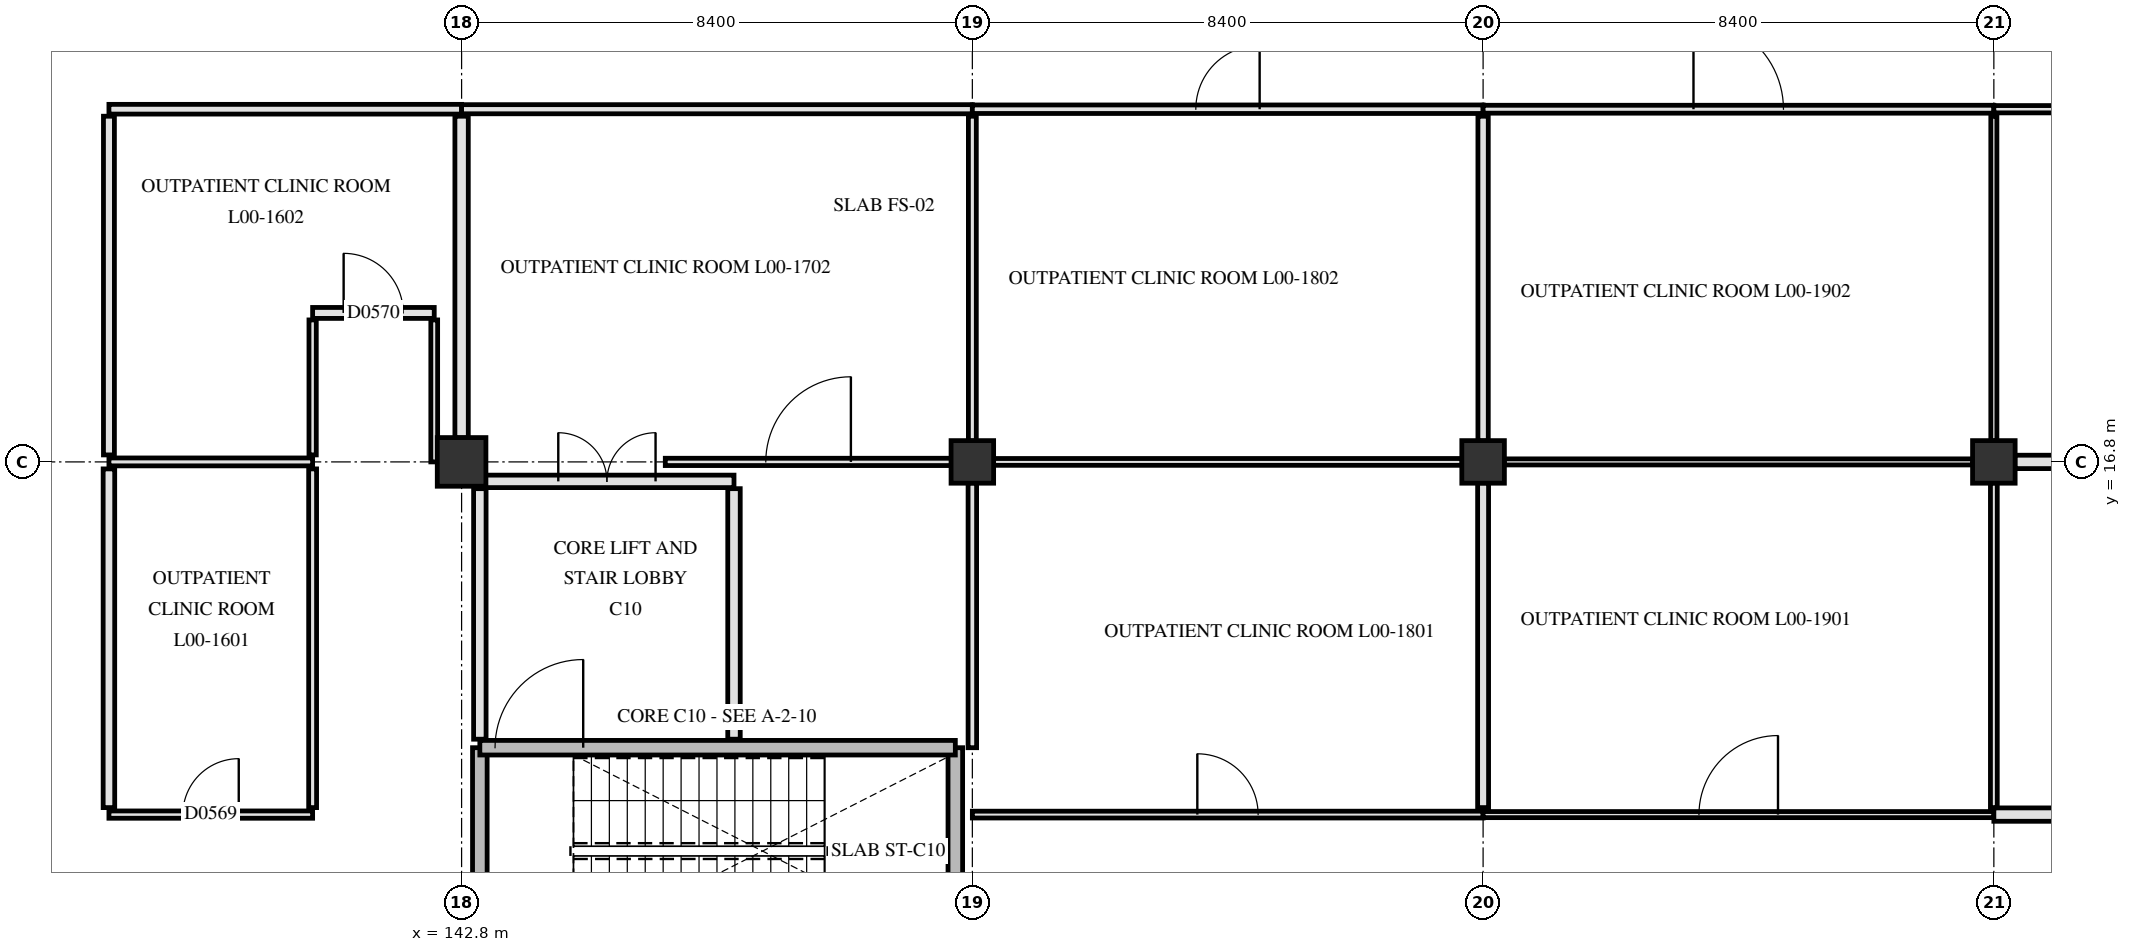
"""IFC4 building model, lengths in metres.
Left out: names, types, materials, properties, quantities, classifications, styles, units other than length and angle.
Written with IfcOpenShell. Run it as: python <this file> out.ifc"""

import sys

from ifc_helpers import new_model, si_unit, direction, frame, frame_2d, origin, origin_2d, place, context, subcontext, project, spatial, rectangle, extrude, element, fill, save


model = new_model("IFC4")
c1 = context("Model", 3, precision=1e-05, world=origin(), true_north=direction((0.0, 1.0)))
c2 = subcontext(c1, "Body", "Model", "MODEL_VIEW")
j1 = project(units=[si_unit("LENGTHUNIT", "METRE"), si_unit("PLANEANGLEUNIT", "RADIAN")], contexts=[c1])
p1 = place(None, origin())
s1 = spatial("IfcSite", under=j1, at=p1, CompositionType="ELEMENT")
p2 = place(p1, origin())
s2 = spatial("IfcBuilding", under=s1, at=p2, CompositionType="ELEMENT")
p3 = place(p2, origin())
s3 = spatial("IfcBuildingStorey", under=s2, at=p3, CompositionType="ELEMENT", Elevation=0.0)
p4 = place(p3, frame((142.8, 16.8, 0.0), z_axis=(0.0, 0.0, 1.0), x_axis=(1.0, 0.0, 0.0)))
e1 = element("IfcColumn", 1, at=p4, inside=s3, PredefinedType="COLUMN", context=c2, shape_type="SweptSolid", body=[
    extrude(rectangle(XDim=0.8, YDim=0.8, at=origin_2d()), origin(), (0.0, 0.0, 1.0), 4.8),
])
for number, where, z_axis, x_axis in (
    (2, (151.2, 16.8, 0.0), (0.0, 0.0, 1.0), (1.0, 0.0, 0.0)),
    (3, (159.6, 16.8, 0.0), (0.0, 0.0, 1.0), (1.0, 0.0, 0.0)),
    (4, (168.0, 16.8, 0.0), (0.0, 0.0, 1.0), (1.0, 0.0, 0.0)),
):
    element("IfcColumn", number, at=place(p3, frame(where, z_axis=z_axis, x_axis=x_axis)), inside=s3, PredefinedType="COLUMN", context=c2, shape_type="SweptSolid", body=[
        extrude(rectangle(XDim=0.7, YDim=0.7, at=origin_2d()), origin(), (0.0, 0.0, 1.0), 4.8),
    ])
for number, where, z_axis, x_axis in (
    (5, (143.1, 8.78, 0.0), (0.0, 0.0, 1.0), (0.0, 1.0, 0.0)),
    (6, (150.92, 8.78, 0.0), (0.0, 0.0, 1.0), (0.0, 1.0, 0.0)),
):
    element("IfcWall", number, at=place(p3, frame(where, z_axis=z_axis, x_axis=x_axis)), inside=s3, PredefinedType="SHEAR", context=c2, shape_type="SweptSolid", body=[
        extrude(rectangle(XDim=3.32, YDim=0.24, at=frame_2d((1.66, 0.0))), origin(), (0.0, 0.0, 1.0), 4.5),
    ])
p5 = place(p3, frame((143.1, 12.1, 0.0), z_axis=(0.0, 0.0, 1.0), x_axis=(1.0, 0.0, 0.0)))
e7 = element("IfcWall", 7, at=p5, inside=s3, PredefinedType="SHEAR", context=c2, shape_type="SweptSolid", body=[
    extrude(rectangle(XDim=7.82, YDim=0.24, at=frame_2d((3.91, 0.0))), origin(), (0.0, 0.0, 1.0), 4.5),
])
p6 = place(p5, frame((0.25, 0.0, 0.0)))
e8 = element("IfcOpeningElement", 8, at=p6, cuts=e7, PredefinedType="OPENING", context=c2, shape_type="SweptSolid", body=[
    extrude(rectangle(XDim=1.45, YDim=2.2, at=frame_2d((0.725, 1.1))), frame((0.0, 0.13, 0.0), z_axis=(0.0, -1.0, 0.0), x_axis=(1.0, 0.0, 0.0)), (0.0, 0.0, 1.0), 0.26),
])
p7 = place(p3, frame((147.28, 12.24, 0.0), z_axis=(0.0, 0.0, 1.0), x_axis=(0.0, 1.0, 0.0)))
e9 = element("IfcWall", 9, at=p7, inside=s3, PredefinedType="PARTITIONING", context=c2, shape_type="SweptSolid", body=[
    extrude(rectangle(XDim=4.12, YDim=0.205, at=frame_2d((2.06, 0.0))), origin(), (0.0, 0.0, 1.0), 4.49),
])
p8 = place(p3, frame((143.1, 12.24, 0.0), z_axis=(0.0, 0.0, 1.0), x_axis=(0.0, 1.0, 0.0)))
e10 = element("IfcWall", 10, at=p8, inside=s3, PredefinedType="PARTITIONING", context=c2, shape_type="SweptSolid", body=[
    extrude(rectangle(XDim=4.12, YDim=0.205, at=frame_2d((2.06, 0.0))), origin(), (0.0, 0.0, 1.0), 3.89),
])
p9 = place(p3, frame((143.1, 16.48, 0.0), z_axis=(0.0, 0.0, 1.0), x_axis=(1.0, 0.0, 0.0)))
e11 = element("IfcWall", 11, at=p9, inside=s3, PredefinedType="PARTITIONING", context=c2, shape_type="SweptSolid", body=[
    extrude(rectangle(XDim=4.18, YDim=0.205, at=frame_2d((2.09, 0.0))), origin(), (0.0, 0.0, 1.0), 3.84),
])
p10 = place(p9, frame((1.29, 0.0, 0.0)))
e12 = element("IfcOpeningElement", 12, at=p10, cuts=e11, PredefinedType="OPENING", context=c2, shape_type="SweptSolid", body=[
    extrude(rectangle(XDim=1.6, YDim=2.25, at=frame_2d((0.8, 1.125))), frame((0.0, 0.113, 0.0), z_axis=(0.0, -1.0, 0.0), x_axis=(1.0, 0.0, 0.0)), (0.0, 0.0, 1.0), 0.225),
])
p11 = place(p3, frame((137.0, 11.0, 0.0), z_axis=(0.0, 0.0, 1.0), x_axis=(1.0, 0.0, 0.0)))
e13 = element("IfcWall", 13, at=p11, inside=s3, PredefinedType="PARTITIONING", context=c2, shape_type="SweptSolid", body=[
    extrude(rectangle(XDim=3.35, YDim=0.12, at=frame_2d((1.675, 0.0))), origin(), (0.0, 0.0, 1.0), 4.49),
])
p12 = place(p11, frame((1.215, 0.0, 0.0)))
e14 = element("IfcOpeningElement", 14, at=p12, cuts=e13, PredefinedType="OPENING", context=c2, shape_type="SweptSolid", body=[
    extrude(rectangle(XDim=0.92, YDim=2.08, at=frame_2d((0.46, 1.04))), frame((0.0, 0.07, 0.0), z_axis=(0.0, -1.0, 0.0), x_axis=(1.0, 0.0, 0.0)), (0.0, 0.0, 1.0), 0.14),
])
p13 = place(p3, frame((151.2, 11.0, 0.0), z_axis=(0.0, 0.0, 1.0), x_axis=(1.0, 0.0, 0.0)))
e15 = element("IfcWall", 15, at=p13, inside=s3, PredefinedType="PARTITIONING", context=c2, shape_type="SweptSolid", body=[
    extrude(rectangle(XDim=8.4, YDim=0.112, at=frame_2d((4.2, 0.0))), origin(), (0.0, 0.0, 1.0), 3.89),
])
p14 = place(p13, frame((3.7, 0.0, 0.0)))
e16 = element("IfcOpeningElement", 16, at=p14, cuts=e15, PredefinedType="OPENING", context=c2, shape_type="SweptSolid", body=[
    extrude(rectangle(XDim=1.0, YDim=2.15, at=frame_2d((0.5, 1.075))), frame((0.0, 0.066, 0.0), z_axis=(0.0, -1.0, 0.0), x_axis=(1.0, 0.0, 0.0)), (0.0, 0.0, 1.0), 0.132),
])
p15 = place(p3, frame((159.6, 11.0, 0.0), z_axis=(0.0, 0.0, 1.0), x_axis=(1.0, 0.0, 0.0)))
e17 = element("IfcWall", 17, at=p15, inside=s3, PredefinedType="PARTITIONING", context=c2, shape_type="SweptSolid", body=[
    extrude(rectangle(XDim=8.4, YDim=0.1, at=frame_2d((4.2, 0.0))), origin(), (0.0, 0.0, 1.0), 3.89),
])
p16 = place(p15, frame((3.55, 0.0, 0.0)))
e18 = element("IfcOpeningElement", 18, at=p16, cuts=e17, PredefinedType="OPENING", context=c2, shape_type="SweptSolid", body=[
    extrude(rectangle(XDim=1.3, YDim=2.2, at=frame_2d((0.65, 1.1))), frame((0.0, 0.06, 0.0), z_axis=(0.0, -1.0, 0.0), x_axis=(1.0, 0.0, 0.0)), (0.0, 0.0, 1.0), 0.12),
])
p17 = place(p3, frame((168.0, 11.0, 0.0), z_axis=(0.0, 0.0, 1.0), x_axis=(1.0, 0.0, 0.0)))
e19 = element("IfcWall", 19, at=p17, inside=s3, PredefinedType="PARTITIONING", context=c2, shape_type="SweptSolid", body=[
    extrude(rectangle(XDim=8.018, YDim=0.22, at=frame_2d((4.009, 0.0))), origin(), (0.0, 0.0, 1.0), 3.89),
])
p18 = place(p17, frame((3.469, 0.0, 0.0)))
e20 = element("IfcOpeningElement", 20, at=p18, cuts=e19, PredefinedType="OPENING", context=c2, shape_type="SweptSolid", body=[
    extrude(rectangle(XDim=1.08, YDim=2.12, at=frame_2d((0.54, 1.06))), frame((0.0, 0.12, 0.0), z_axis=(0.0, -1.0, 0.0), x_axis=(1.0, 0.0, 0.0)), (0.0, 0.0, 1.0), 0.24),
])
p19 = place(p3, frame((137.0, 16.8, 0.0), z_axis=(0.0, 0.0, 1.0), x_axis=(1.0, 0.0, 0.0)))
e21 = element("IfcWall", 21, at=p19, inside=s3, PredefinedType="PARTITIONING", context=c2, shape_type="SweptSolid", body=[
    extrude(rectangle(XDim=3.35, YDim=0.13, at=frame_2d((1.675, 0.0))), origin(), (0.0, 0.0, 1.0), 3.84),
])
p20 = place(p3, frame((146.15, 16.8, 0.0), z_axis=(0.0, 0.0, 1.0), x_axis=(1.0, 0.0, 0.0)))
e22 = element("IfcWall", 22, at=p20, inside=s3, PredefinedType="PARTITIONING", context=c2, shape_type="SweptSolid", body=[
    extrude(rectangle(XDim=4.705, YDim=0.12, at=frame_2d((2.353, 0.0))), origin(), (0.0, 0.0, 1.0), 3.84),
])
p21 = place(p20, frame((1.653, 0.0, 0.0)))
e23 = element("IfcOpeningElement", 23, at=p21, cuts=e22, PredefinedType="OPENING", context=c2, shape_type="SweptSolid", body=[
    extrude(rectangle(XDim=1.4, YDim=2.2, at=frame_2d((0.7, 1.1))), frame((0.0, 0.07, 0.0), z_axis=(0.0, -1.0, 0.0), x_axis=(1.0, 0.0, 0.0)), (0.0, 0.0, 1.0), 0.14),
])
p22 = place(p3, frame((151.545, 16.8, 0.0), z_axis=(0.0, 0.0, 1.0), x_axis=(1.0, 0.0, 0.0)))
e24 = element("IfcWall", 24, at=p22, inside=s3, PredefinedType="PARTITIONING", context=c2, shape_type="SweptSolid", body=[
    extrude(rectangle(XDim=7.71, YDim=0.112, at=frame_2d((3.855, 0.0))), origin(), (0.0, 0.0, 1.0), 3.84),
])
p23 = place(p3, frame((159.945, 16.8, 0.0), z_axis=(0.0, 0.0, 1.0), x_axis=(1.0, 0.0, 0.0)))
e25 = element("IfcWall", 25, at=p23, inside=s3, PredefinedType="PARTITIONING", context=c2, shape_type="SweptSolid", body=[
    extrude(rectangle(XDim=7.71, YDim=0.1, at=frame_2d((3.855, 0.0))), origin(), (0.0, 0.0, 1.0), 3.84),
])
p24 = place(p3, frame((168.345, 16.8, 0.0), z_axis=(0.0, 0.0, 1.0), x_axis=(1.0, 0.0, 0.0)))
e26 = element("IfcWall", 26, at=p24, inside=s3, PredefinedType="PARTITIONING", context=c2, shape_type="SweptSolid", body=[
    extrude(rectangle(XDim=7.665, YDim=0.22, at=frame_2d((3.833, 0.0))), origin(), (0.0, 0.0, 1.0), 3.84),
])
p25 = place(p3, frame((140.35, 19.25, 0.0), z_axis=(0.0, 0.0, 1.0), x_axis=(1.0, 0.0, 0.0)))
e27 = element("IfcWall", 27, at=p25, inside=s3, PredefinedType="PARTITIONING", context=c2, shape_type="SweptSolid", body=[
    extrude(rectangle(XDim=2.0, YDim=0.18, at=frame_2d((1.0, 0.0))), origin(), (0.0, 0.0, 1.0), 4.49),
])
p26 = place(p25, frame((0.51, 0.0, 0.0)))
e28 = element("IfcOpeningElement", 28, at=p26, cuts=e27, PredefinedType="OPENING", context=c2, shape_type="SweptSolid", body=[
    extrude(rectangle(XDim=0.98, YDim=2.12, at=frame_2d((0.49, 1.06))), frame((0.0, 0.1, 0.0), z_axis=(0.0, -1.0, 0.0), x_axis=(1.0, 0.0, 0.0)), (0.0, 0.0, 1.0), 0.2),
])
p27 = place(p3, frame((137.0, 22.6, 0.0), z_axis=(0.0, 0.0, 1.0), x_axis=(1.0, 0.0, 0.0)))
e29 = element("IfcWall", 29, at=p27, inside=s3, PredefinedType="PARTITIONING", context=c2, shape_type="SweptSolid", body=[
    extrude(rectangle(XDim=5.8, YDim=0.16, at=frame_2d((2.9, 0.0))), origin(), (0.0, 0.0, 1.0), 3.89),
])
p28 = place(p3, frame((142.8, 22.6, 0.0), z_axis=(0.0, 0.0, 1.0), x_axis=(1.0, 0.0, 0.0)))
e30 = element("IfcWall", 30, at=p28, inside=s3, PredefinedType="PARTITIONING", context=c2, shape_type="SweptSolid", body=[
    extrude(rectangle(XDim=8.4, YDim=0.15, at=frame_2d((4.2, 0.0))), origin(), (0.0, 0.0, 1.0), 3.89),
])
p29 = place(p3, frame((151.2, 22.6, 0.0), z_axis=(0.0, 0.0, 1.0), x_axis=(1.0, 0.0, 0.0)))
e31 = element("IfcWall", 31, at=p29, inside=s3, PredefinedType="PARTITIONING", context=c2, shape_type="SweptSolid", body=[
    extrude(rectangle(XDim=8.4, YDim=0.14, at=frame_2d((4.2, 0.0))), origin(), (0.0, 0.0, 1.0), 3.89),
])
p30 = place(p29, frame((3.675, 0.0, 0.0)))
e32 = element("IfcOpeningElement", 32, at=p30, cuts=e31, PredefinedType="OPENING", context=c2, shape_type="SweptSolid", body=[
    extrude(rectangle(XDim=1.05, YDim=2.15, at=frame_2d((0.525, 1.075))), frame((0.0, 0.08, 0.0), z_axis=(0.0, -1.0, 0.0), x_axis=(1.0, 0.0, 0.0)), (0.0, 0.0, 1.0), 0.16),
])
p31 = place(p3, frame((159.6, 22.6, 0.0), z_axis=(0.0, 0.0, 1.0), x_axis=(1.0, 0.0, 0.0)))
e33 = element("IfcWall", 33, at=p31, inside=s3, PredefinedType="PARTITIONING", context=c2, shape_type="SweptSolid", body=[
    extrude(rectangle(XDim=8.4, YDim=0.13, at=frame_2d((4.2, 0.0))), origin(), (0.0, 0.0, 1.0), 3.89),
])
p32 = place(p31, frame((3.46, 0.0, 0.0)))
e34 = element("IfcOpeningElement", 34, at=p32, cuts=e33, PredefinedType="OPENING", context=c2, shape_type="SweptSolid", body=[
    extrude(rectangle(XDim=1.48, YDim=2.22, at=frame_2d((0.74, 1.11))), frame((0.0, 0.075, 0.0), z_axis=(0.0, -1.0, 0.0), x_axis=(1.0, 0.0, 0.0)), (0.0, 0.0, 1.0), 0.15),
])
p33 = place(p3, frame((168.0, 22.6, 0.0), z_axis=(0.0, 0.0, 1.0), x_axis=(1.0, 0.0, 0.0)))
e35 = element("IfcWall", 35, at=p33, inside=s3, PredefinedType="PARTITIONING", context=c2, shape_type="SweptSolid", body=[
    extrude(rectangle(XDim=8.01, YDim=0.12, at=frame_2d((4.005, 0.0))), origin(), (0.0, 0.0, 1.0), 3.89),
])
p34 = place(p33, frame((3.395, 0.0, 0.0)))
e36 = element("IfcOpeningElement", 36, at=p34, cuts=e35, PredefinedType="OPENING", context=c2, shape_type="SweptSolid", body=[
    extrude(rectangle(XDim=1.22, YDim=2.18, at=frame_2d((0.61, 1.09))), frame((0.0, 0.07, 0.0), z_axis=(0.0, -1.0, 0.0), x_axis=(1.0, 0.0, 0.0)), (0.0, 0.0, 1.0), 0.14),
])
p35 = place(p3, frame((137.0, 11.115, 0.0), z_axis=(0.0, 0.0, 1.0), x_axis=(0.0, 1.0, 0.0)))
e37 = element("IfcWall", 37, at=p35, inside=s3, PredefinedType="PARTITIONING", context=c2, shape_type="SweptSolid", body=[
    extrude(rectangle(XDim=5.57, YDim=0.19, at=frame_2d((2.785, 0.0))), origin(), (0.0, 0.0, 1.0), 3.84),
])
p36 = place(p3, frame((137.0, 16.915, 0.0), z_axis=(0.0, 0.0, 1.0), x_axis=(0.0, 1.0, 0.0)))
e38 = element("IfcWall", 38, at=p36, inside=s3, PredefinedType="PARTITIONING", context=c2, shape_type="SweptSolid", body=[
    extrude(rectangle(XDim=5.57, YDim=0.18, at=frame_2d((2.785, 0.0))), origin(), (0.0, 0.0, 1.0), 3.84),
])
p37 = place(p3, frame((140.35, 11.115, 0.0), z_axis=(0.0, 0.0, 1.0), x_axis=(0.0, 1.0, 0.0)))
e39 = element("IfcWall", 39, at=p37, inside=s3, PredefinedType="PARTITIONING", context=c2, shape_type="SweptSolid", body=[
    extrude(rectangle(XDim=5.57, YDim=0.13, at=frame_2d((2.785, 0.0))), origin(), (0.0, 0.0, 1.0), 3.84),
])
p38 = place(p3, frame((140.35, 16.915, 0.0), z_axis=(0.0, 0.0, 1.0), x_axis=(0.0, 1.0, 0.0)))
e40 = element("IfcWall", 40, at=p38, inside=s3, PredefinedType="PARTITIONING", context=c2, shape_type="SweptSolid", body=[
    extrude(rectangle(XDim=2.22, YDim=0.12, at=frame_2d((1.11, 0.0))), origin(), (0.0, 0.0, 1.0), 3.84),
])
p39 = place(p3, frame((142.35, 16.8, 0.0), z_axis=(0.0, 0.0, 1.0), x_axis=(0.0, 1.0, 0.0)))
e41 = element("IfcWall", 41, at=p39, inside=s3, PredefinedType="PARTITIONING", context=c2, shape_type="SweptSolid", body=[
    extrude(rectangle(XDim=2.335, YDim=0.112, at=frame_2d((1.167, 0.0))), origin(), (0.0, 0.0, 1.0), 3.84),
])
p40 = place(p3, frame((142.8, 17.195, 0.0), z_axis=(0.0, 0.0, 1.0), x_axis=(0.0, 1.0, 0.0)))
e42 = element("IfcWall", 42, at=p40, inside=s3, PredefinedType="PARTITIONING", context=c2, shape_type="SweptSolid", body=[
    extrude(rectangle(XDim=5.29, YDim=0.22, at=frame_2d((2.645, 0.0))), origin(), (0.0, 0.0, 1.0), 3.89),
])
p41 = place(p3, frame((151.2, 12.1, 0.0), z_axis=(0.0, 0.0, 1.0), x_axis=(0.0, 1.0, 0.0)))
e43 = element("IfcWall", 43, at=p41, inside=s3, PredefinedType="PARTITIONING", context=c2, shape_type="SweptSolid", body=[
    extrude(rectangle(XDim=4.355, YDim=0.14, at=frame_2d((2.177, 0.0))), origin(), (0.0, 0.0, 1.0), 3.89),
])
p42 = place(p3, frame((151.2, 17.145, 0.0), z_axis=(0.0, 0.0, 1.0), x_axis=(0.0, 1.0, 0.0)))
e44 = element("IfcWall", 44, at=p42, inside=s3, PredefinedType="PARTITIONING", context=c2, shape_type="SweptSolid", body=[
    extrude(rectangle(XDim=5.34, YDim=0.13, at=frame_2d((2.67, 0.0))), origin(), (0.0, 0.0, 1.0), 3.89),
])
p43 = place(p3, frame((159.6, 11.115, 0.0), z_axis=(0.0, 0.0, 1.0), x_axis=(0.0, 1.0, 0.0)))
e45 = element("IfcWall", 45, at=p43, inside=s3, PredefinedType="PARTITIONING", context=c2, shape_type="SweptSolid", body=[
    extrude(rectangle(XDim=5.34, YDim=0.18, at=frame_2d((2.67, 0.0))), origin(), (0.0, 0.0, 1.0), 3.89),
])
p44 = place(p3, frame((159.6, 17.145, 0.0), z_axis=(0.0, 0.0, 1.0), x_axis=(0.0, 1.0, 0.0)))
e46 = element("IfcWall", 46, at=p44, inside=s3, PredefinedType="PARTITIONING", context=c2, shape_type="SweptSolid", body=[
    extrude(rectangle(XDim=5.34, YDim=0.17, at=frame_2d((2.67, 0.0))), origin(), (0.0, 0.0, 1.0), 3.89),
])
p45 = place(p3, frame((168.0, 11.115, 0.0), z_axis=(0.0, 0.0, 1.0), x_axis=(0.0, 1.0, 0.0)))
e47 = element("IfcWall", 47, at=p45, inside=s3, PredefinedType="PARTITIONING", context=c2, shape_type="SweptSolid", body=[
    extrude(rectangle(XDim=5.34, YDim=0.112, at=frame_2d((2.67, 0.0))), origin(), (0.0, 0.0, 1.0), 3.89),
])
p46 = place(p3, frame((168.0, 17.145, 0.0), z_axis=(0.0, 0.0, 1.0), x_axis=(0.0, 1.0, 0.0)))
e48 = element("IfcWall", 48, at=p46, inside=s3, PredefinedType="PARTITIONING", context=c2, shape_type="SweptSolid", body=[
    extrude(rectangle(XDim=5.34, YDim=0.1, at=frame_2d((2.67, 0.0))), origin(), (0.0, 0.0, 1.0), 3.89),
])
p47 = place(p6, origin())
e49 = element("IfcDoor", 49, at=p47, inside=s3, OperationType="SINGLE_SWING_RIGHT", PredefinedType="DOOR", context=c2, shape_type="SweptSolid", body=[
    extrude(rectangle(XDim=1.45, YDim=2.2, at=frame_2d((0.725, 1.1))), frame((0.0, 0.025, 0.0), z_axis=(0.0, -1.0, 0.0), x_axis=(1.0, 0.0, 0.0)), (0.0, 0.0, 1.0), 0.05),
])
fill(e8, e49)
p48 = place(p10, origin())
e50 = element("IfcDoor", 50, at=p48, inside=s3, OperationType="DOUBLE_SWING_LEFT", PredefinedType="DOOR", context=c2, shape_type="SweptSolid", body=[
    extrude(rectangle(XDim=1.6, YDim=2.25, at=frame_2d((0.8, 1.125))), frame((0.0, 0.025, 0.0), z_axis=(0.0, -1.0, 0.0), x_axis=(1.0, 0.0, 0.0)), (0.0, 0.0, 1.0), 0.05),
])
fill(e12, e50)
p49 = place(p12, origin())
e51 = element("IfcDoor", 51, at=p49, inside=s3, OperationType="SINGLE_SWING_RIGHT", PredefinedType="DOOR", context=c2, shape_type="SweptSolid", body=[
    extrude(rectangle(XDim=0.92, YDim=2.08, at=frame_2d((0.46, 1.04))), frame((0.0, 0.025, 0.0), z_axis=(0.0, -1.0, 0.0), x_axis=(1.0, 0.0, 0.0)), (0.0, 0.0, 1.0), 0.05),
])
fill(e14, e51)
p50 = place(p26, origin())
e52 = element("IfcDoor", 52, at=p50, inside=s3, OperationType="SINGLE_SWING_LEFT", PredefinedType="DOOR", context=c2, shape_type="SweptSolid", body=[
    extrude(rectangle(XDim=0.98, YDim=2.12, at=frame_2d((0.49, 1.06))), frame((0.0, 0.025, 0.0), z_axis=(0.0, -1.0, 0.0), x_axis=(1.0, 0.0, 0.0)), (0.0, 0.0, 1.0), 0.05),
])
fill(e28, e52)
p51 = place(p21, origin())
e53 = element("IfcDoor", 53, at=p51, inside=s3, OperationType="SINGLE_SWING_RIGHT", PredefinedType="DOOR", context=c2, shape_type="SweptSolid", body=[
    extrude(rectangle(XDim=1.4, YDim=2.2, at=frame_2d((0.7, 1.1))), frame((0.0, 0.025, 0.0), z_axis=(0.0, -1.0, 0.0), x_axis=(1.0, 0.0, 0.0)), (0.0, 0.0, 1.0), 0.05),
])
fill(e23, e53)
p52 = place(p14, origin())
e54 = element("IfcDoor", 54, at=p52, inside=s3, OperationType="SINGLE_SWING_LEFT", PredefinedType="DOOR", context=c2, shape_type="SweptSolid", body=[
    extrude(rectangle(XDim=1.0, YDim=2.15, at=frame_2d((0.5, 1.075))), frame((0.0, 0.025, 0.0), z_axis=(0.0, -1.0, 0.0), x_axis=(1.0, 0.0, 0.0)), (0.0, 0.0, 1.0), 0.05),
])
fill(e16, e54)
p53 = place(p30, origin())
e55 = element("IfcDoor", 55, at=p53, inside=s3, OperationType="SINGLE_SWING_RIGHT", PredefinedType="DOOR", context=c2, shape_type="SweptSolid", body=[
    extrude(rectangle(XDim=1.05, YDim=2.15, at=frame_2d((0.525, 1.075))), frame((0.0, 0.025, 0.0), z_axis=(0.0, -1.0, 0.0), x_axis=(1.0, 0.0, 0.0)), (0.0, 0.0, 1.0), 0.05),
])
fill(e32, e55)
p54 = place(p16, origin())
e56 = element("IfcDoor", 56, at=p54, inside=s3, OperationType="SINGLE_SWING_RIGHT", PredefinedType="DOOR", context=c2, shape_type="SweptSolid", body=[
    extrude(rectangle(XDim=1.3, YDim=2.2, at=frame_2d((0.65, 1.1))), frame((0.0, 0.025, 0.0), z_axis=(0.0, -1.0, 0.0), x_axis=(1.0, 0.0, 0.0)), (0.0, 0.0, 1.0), 0.05),
])
fill(e18, e56)
p55 = place(p32, origin())
e57 = element("IfcDoor", 57, at=p55, inside=s3, OperationType="SINGLE_SWING_LEFT", PredefinedType="DOOR", context=c2, shape_type="SweptSolid", body=[
    extrude(rectangle(XDim=1.48, YDim=2.22, at=frame_2d((0.74, 1.11))), frame((0.0, 0.025, 0.0), z_axis=(0.0, -1.0, 0.0), x_axis=(1.0, 0.0, 0.0)), (0.0, 0.0, 1.0), 0.05),
])
fill(e34, e57)
save(model, sys.argv[1])
